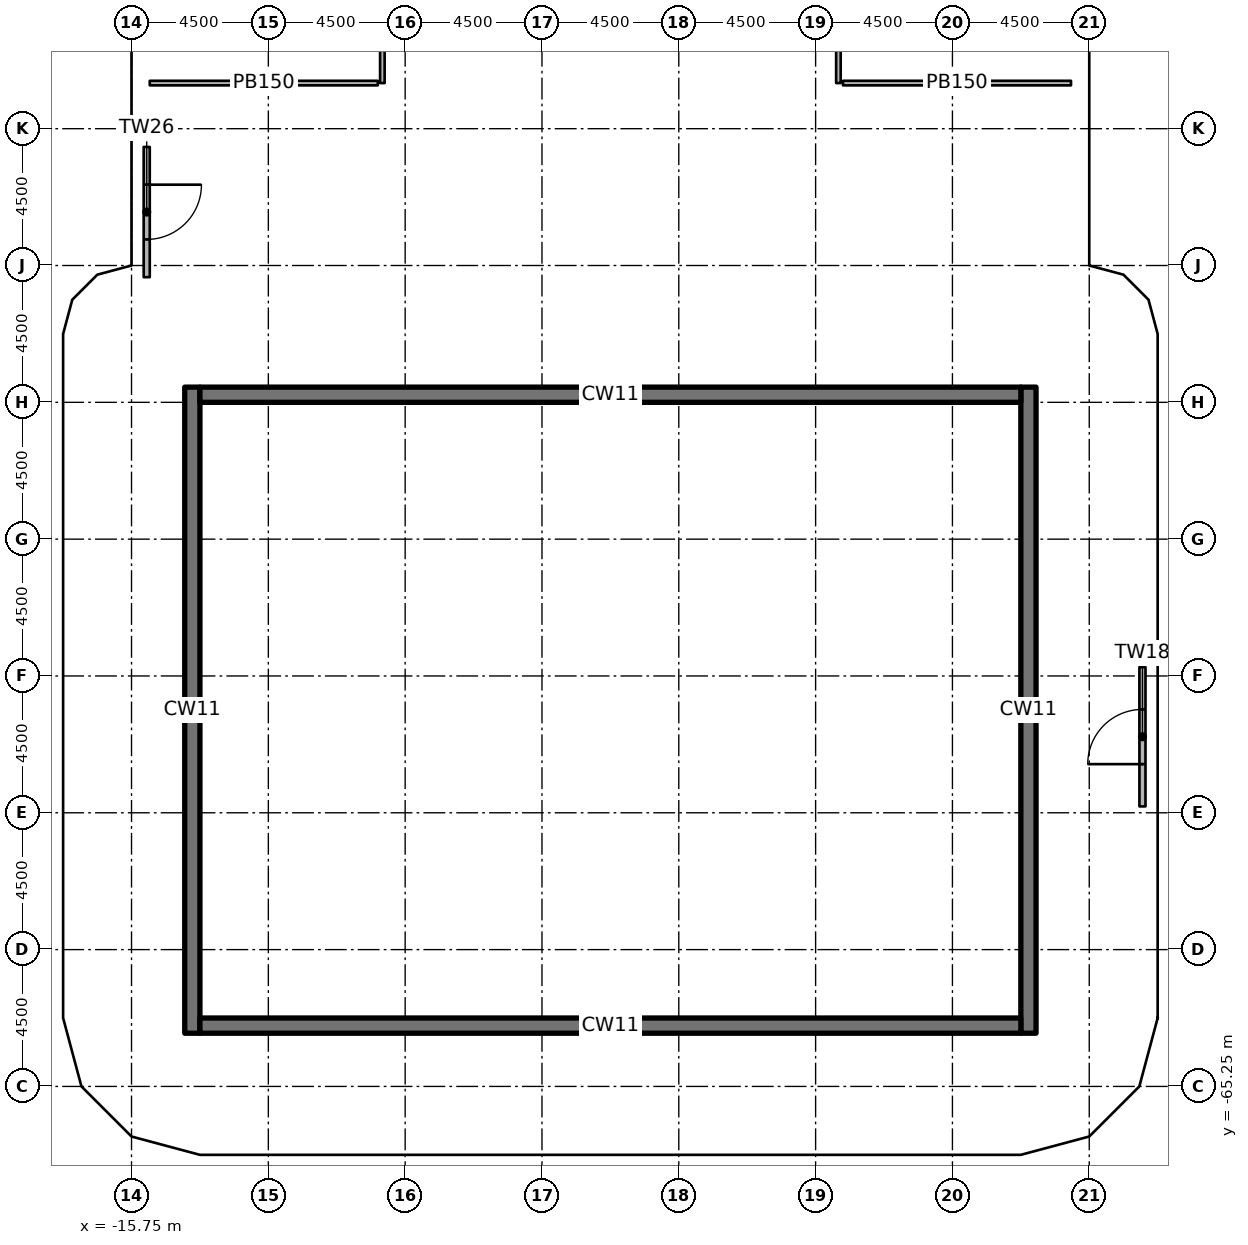
"""IFC4 building model, lengths in metres.
Left out: names, types, materials, properties, quantities, classifications, styles, units other than length and angle.
Written with IfcOpenShell. Run it as: python <this file> out.ifc"""

import sys

from ifc_helpers import new_model, si_unit, direction, frame, frame_2d, origin, origin_2d, place, context, subcontext, project, spatial, rectangle, extrude, element, fill, save


model = new_model("IFC4")
c1 = context("Model", 3, precision=1e-05, world=origin(), true_north=direction((0.0, 1.0)))
c2 = subcontext(c1, "Body", "Model", "MODEL_VIEW")
j1 = project(units=[si_unit("LENGTHUNIT", "METRE"), si_unit("PLANEANGLEUNIT", "RADIAN")], contexts=[c1])
p1 = place(None, origin())
s1 = spatial("IfcSite", under=j1, at=p1, CompositionType="ELEMENT")
p2 = place(p1, origin())
s2 = spatial("IfcBuilding", under=s1, at=p2, CompositionType="ELEMENT")
p3 = place(p2, frame((0.0, 0.0, 17.0)))
s3 = spatial("IfcBuildingStorey", under=s2, at=p3, CompositionType="ELEMENT", Elevation=17.0)
for number, where, z_axis, x_axis in (
    (1, (-15.75, -60.75, 0.0), (0.0, 0.0, 1.0), (1.0, 0.0, 0.0)),
    (2, (-15.75, -56.25, 0.0), (0.0, 0.0, 1.0), (1.0, 0.0, 0.0)),
    (3, (-15.75, -51.75, 0.0), (0.0, 0.0, 1.0), (1.0, 0.0, 0.0)),
    (4, (-15.75, -47.25, 0.0), (0.0, 0.0, 1.0), (1.0, 0.0, 0.0)),
    (5, (-15.75, -42.75, 0.0), (0.0, 0.0, 1.0), (1.0, 0.0, 0.0)),
    (6, (-15.367, -39.68, 0.0), (0.0, 0.0, 1.0), (1.0, 0.0, 0.0)),
    (7, (-15.15, -33.75, 0.0), (0.0, 0.0, 1.0), (1.0, 0.0, 0.0)),
    (8, (-11.25, -65.25, 0.0), (0.0, 0.0, 1.0), (1.0, 0.0, 0.0)),
    (9, (-10.65, -38.85, 0.0), (0.0, 0.0, 1.0), (1.0, 0.0, 0.0)),
    (10, (-6.75, -65.25, 0.0), (0.0, 0.0, 1.0), (1.0, 0.0, 0.0)),
    (11, (-2.25, -65.25, 0.0), (0.0, 0.0, 1.0), (1.0, 0.0, 0.0)),
    (12, (-2.25, -33.11, 0.0), (0.0, 0.0, 1.0), (1.0, 0.0, 0.0)),
    (13, (2.25, -65.25, 0.0), (0.0, 0.0, 1.0), (1.0, 0.0, 0.0)),
    (14, (2.25, -33.11, 0.0), (0.0, 0.0, 1.0), (1.0, 0.0, 0.0)),
    (15, (6.75, -65.25, 0.0), (0.0, 0.0, 1.0), (1.0, 0.0, 0.0)),
    (16, (11.25, -65.25, 0.0), (0.0, 0.0, 1.0), (1.0, 0.0, 0.0)),
    (17, (10.65, -38.85, 0.0), (0.0, 0.0, 1.0), (1.0, 0.0, 0.0)),
    (18, (10.65, -33.75, 0.0), (0.0, 0.0, 1.0), (1.0, 0.0, 0.0)),
    (19, (15.75, -60.75, 0.0), (0.0, 0.0, 1.0), (1.0, 0.0, 0.0)),
    (20, (15.75, -56.25, 0.0), (0.0, 0.0, 1.0), (1.0, 0.0, 0.0)),
    (21, (15.75, -51.75, 0.0), (0.0, 0.0, 1.0), (1.0, 0.0, 0.0)),
    (22, (15.75, -47.25, 0.0), (0.0, 0.0, 1.0), (1.0, 0.0, 0.0)),
    (23, (15.75, -42.75, 0.0), (0.0, 0.0, 1.0), (1.0, 0.0, 0.0)),
    (24, (15.367, -39.68, 0.0), (0.0, 0.0, 1.0), (1.0, 0.0, 0.0)),
):
    element("IfcColumn", number, at=place(p3, frame(where, z_axis=z_axis, x_axis=x_axis)), inside=s3, PredefinedType="COLUMN", context=c2, shape_type="SweptSolid", body=[
        extrude(rectangle(XDim=1.2, YDim=1.2, at=origin_2d()), origin(), (0.0, 0.0, 1.0), 4.55),
    ])
for number, where, z_axis, x_axis in (
    (25, (-13.75, -63.5, 0.0), (0.0, 0.0, 1.0), (0.0, 1.0, 0.0)),
    (26, (13.75, -63.5, 0.0), (0.0, 0.0, 1.0), (0.0, 1.0, 0.0)),
):
    element("IfcWall", number, at=place(p3, frame(where, z_axis=z_axis, x_axis=x_axis)), inside=s3, PredefinedType="SOLIDWALL", context=c2, shape_type="SweptSolid", body=[
        extrude(rectangle(XDim=21.25, YDim=0.5, at=frame_2d((10.625, 0.0))), origin(), (0.0, 0.0, 1.0), 4.55),
    ])
for number, where, z_axis, x_axis in (
    (27, (-13.5, -63.25, 0.0), (0.0, 0.0, 1.0), (1.0, 0.0, 0.0)),
    (28, (-13.5, -42.5, 0.0), (0.0, 0.0, 1.0), (1.0, 0.0, 0.0)),
):
    element("IfcWall", number, at=place(p3, frame(where, z_axis=z_axis, x_axis=x_axis)), inside=s3, PredefinedType="SOLIDWALL", context=c2, shape_type="SweptSolid", body=[
        extrude(rectangle(XDim=27.0, YDim=0.5, at=frame_2d((13.5, 0.0))), origin(), (0.0, 0.0, 1.0), 4.55),
    ])
p4 = place(p3, frame((17.5, -56.04, 0.0), z_axis=(0.0, 0.0, 1.0), x_axis=(0.0, 1.0, 0.0)))
e29 = element("IfcWall", 29, at=p4, inside=s3, PredefinedType="SOLIDWALL", context=c2, shape_type="SweptSolid", body=[
    extrude(rectangle(XDim=4.58, YDim=0.2, at=frame_2d((2.29, 0.0))), origin(), (0.0, 0.0, 1.0), 4.55),
])
p5 = place(p4, frame((1.39, 0.0, 0.0)))
e30 = element("IfcOpeningElement", 30, at=p5, cuts=e29, PredefinedType="OPENING", context=c2, shape_type="SweptSolid", body=[
    extrude(rectangle(XDim=1.8, YDim=2.4, at=frame_2d((0.9, 1.2))), frame((0.0, 0.11, 0.0), z_axis=(0.0, -1.0, 0.0), x_axis=(1.0, 0.0, 0.0)), (0.0, 0.0, 1.0), 0.22),
])
p6 = place(p3, frame((-15.25, -34.35, 0.0), z_axis=(0.0, 0.0, 1.0), x_axis=(0.0, -1.0, 0.0)))
e31 = element("IfcWall", 31, at=p6, inside=s3, PredefinedType="SOLIDWALL", context=c2, shape_type="SweptSolid", body=[
    extrude(rectangle(XDim=4.283, YDim=0.2, at=frame_2d((2.142, 0.0))), origin(), (0.0, 0.0, 1.0), 4.55),
])
p7 = place(p6, frame((1.242, 0.0, 0.0)))
e32 = element("IfcOpeningElement", 32, at=p7, cuts=e31, PredefinedType="OPENING", context=c2, shape_type="SweptSolid", body=[
    extrude(rectangle(XDim=1.8, YDim=2.4, at=frame_2d((0.9, 1.2))), frame((0.0, 0.11, 0.0), z_axis=(0.0, -1.0, 0.0), x_axis=(1.0, 0.0, 0.0)), (0.0, 0.0, 1.0), 0.22),
])
p8 = place(p3, frame((7.5, -20.25, 0.0), z_axis=(0.0, 0.0, 1.0), x_axis=(0.0, -1.0, 0.0)))
e33 = element("IfcWall", 33, at=p8, inside=s3, PredefinedType="PARTITIONING", context=c2, shape_type="SweptSolid", body=[
    extrude(rectangle(XDim=12.0, YDim=0.15, at=frame_2d((6.0, 0.0))), origin(), (0.0, 0.0, 1.0), 4.55),
])
p9 = place(p8, frame((7.5, 0.0, 0.0)))
e34 = element("IfcOpeningElement", 34, at=p9, cuts=e33, PredefinedType="OPENING", context=c2, shape_type="SweptSolid", body=[
    extrude(rectangle(XDim=0.9, YDim=2.1, at=frame_2d((0.45, 1.05))), frame((0.0, 0.085, 0.0), z_axis=(0.0, -1.0, 0.0), x_axis=(1.0, 0.0, 0.0)), (0.0, 0.0, 1.0), 0.17),
])
p10 = place(p3, frame((-7.5, -32.25, 0.0), z_axis=(0.0, 0.0, 1.0), x_axis=(0.0, 1.0, 0.0)))
e35 = element("IfcWall", 35, at=p10, inside=s3, PredefinedType="PARTITIONING", context=c2, shape_type="SweptSolid", body=[
    extrude(rectangle(XDim=12.0, YDim=0.15, at=frame_2d((6.0, 0.0))), origin(), (0.0, 0.0, 1.0), 4.55),
])
p11 = place(p10, frame((6.0, 0.0, 0.0)))
e36 = element("IfcOpeningElement", 36, at=p11, cuts=e35, PredefinedType="OPENING", context=c2, shape_type="SweptSolid", body=[
    extrude(rectangle(XDim=0.9, YDim=2.1, at=frame_2d((0.45, 1.05))), frame((0.0, 0.085, 0.0), z_axis=(0.0, -1.0, 0.0), x_axis=(1.0, 0.0, 0.0)), (0.0, 0.0, 1.0), 0.17),
])
for number, where, z_axis, x_axis in (
    (37, (15.15, -32.25, 0.0), (0.0, 0.0, 1.0), (-1.0, 0.0, 0.0)),
    (38, (-7.65, -32.25, 0.0), (0.0, 0.0, 1.0), (-1.0, 0.0, 0.0)),
):
    element("IfcWall", number, at=place(p3, frame(where, z_axis=z_axis, x_axis=x_axis)), inside=s3, PredefinedType="PARTITIONING", context=c2, shape_type="SweptSolid", body=[
        extrude(rectangle(XDim=7.5, YDim=0.15, at=frame_2d((3.75, 0.0))), origin(), (0.0, 0.0, 1.0), 4.55),
    ])
p12 = place(p5, origin())
e39 = element("IfcDoor", 39, at=p12, inside=s3, OperationType="SINGLE_SWING_LEFT", PredefinedType="DOOR", context=c2, shape_type="SweptSolid", body=[
    extrude(rectangle(XDim=1.8, YDim=2.4, at=frame_2d((0.9, 1.2))), frame((0.0, 0.025, 0.0), z_axis=(0.0, -1.0, 0.0), x_axis=(1.0, 0.0, 0.0)), (0.0, 0.0, 1.0), 0.05),
])
fill(e30, e39)
p13 = place(p7, origin())
e40 = element("IfcDoor", 40, at=p13, inside=s3, OperationType="SINGLE_SWING_LEFT", PredefinedType="DOOR", context=c2, shape_type="SweptSolid", body=[
    extrude(rectangle(XDim=1.8, YDim=2.4, at=frame_2d((0.9, 1.2))), frame((0.0, 0.025, 0.0), z_axis=(0.0, -1.0, 0.0), x_axis=(1.0, 0.0, 0.0)), (0.0, 0.0, 1.0), 0.05),
])
fill(e32, e40)
save(model, sys.argv[1])
